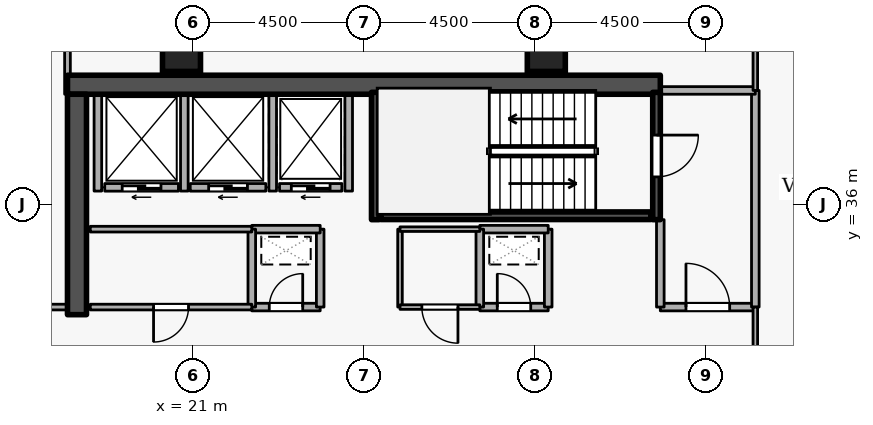
"""IFC4 building model, lengths in metres.
Left out: names, types, materials, properties, quantities, classifications, styles, units other than length and angle.
Written with IfcOpenShell. Run it as: python <this file> out.ifc"""

import sys

from ifc_helpers import new_model, si_unit, direction, frame, frame_2d, origin, origin_2d, place, context, subcontext, project, spatial, rectangle, extrude, element, fill, save


model = new_model("IFC4")
c1 = context("Model", 3, precision=1e-05, world=origin(), true_north=direction((0.0, 1.0)))
c2 = subcontext(c1, "Body", "Model", "MODEL_VIEW")
j1 = project(units=[si_unit("LENGTHUNIT", "METRE"), si_unit("PLANEANGLEUNIT", "RADIAN")], contexts=[c1])
p1 = place(None, origin())
s1 = spatial("IfcSite", under=j1, at=p1, CompositionType="ELEMENT")
p2 = place(p1, origin())
s2 = spatial("IfcBuilding", under=s1, at=p2, CompositionType="ELEMENT")
p3 = place(p2, frame((0.0, 0.0, 236.7)))
s3 = spatial("IfcBuildingStorey", under=s2, at=p3, CompositionType="ELEMENT", Elevation=236.7)
p4 = place(p3, frame((17.7, 39.15, 0.0), z_axis=(0.0, 0.0, 1.0), x_axis=(1.0, 0.0, 0.0)))
e1 = element("IfcWall", 1, at=p4, inside=s3, PredefinedType="SHEAR", context=c2, shape_type="SweptSolid", body=[
    extrude(rectangle(XDim=15.6, YDim=0.5, at=frame_2d((7.8, 0.0))), origin(), (0.0, 0.0, 1.0), 3.6),
])
p5 = place(p3, frame((17.95, 33.1, 0.0), z_axis=(0.0, 0.0, 1.0), x_axis=(0.0, 1.0, 0.0)))
e2 = element("IfcWall", 2, at=p5, inside=s3, PredefinedType="SHEAR", context=c2, shape_type="SweptSolid", body=[
    extrude(rectangle(XDim=5.8, YDim=0.5, at=frame_2d((2.9, 0.0))), origin(), (0.0, 0.0, 1.0), 3.6),
])
for number, where, z_axis, x_axis in (
    (3, (20.7, 40.0, 0.0), (0.0, 0.0, 1.0), (1.0, 0.0, 0.0)),
    (4, (30.3, 40.0, 0.0), (0.0, 0.0, 1.0), (1.0, 0.0, 0.0)),
):
    element("IfcColumn", number, at=place(p3, frame(where, z_axis=z_axis, x_axis=x_axis)), inside=s3, PredefinedType="COLUMN", context=c2, shape_type="SweptSolid", body=[
        extrude(rectangle(XDim=1.0, YDim=1.0, at=origin_2d()), origin(), (0.0, 0.0, 1.0), 3.6),
    ])
p6 = place(p3, frame((24.92, 36.45, 0.0), z_axis=(0.0, 0.0, 1.0), x_axis=(-1.0, 0.0, 0.0)))
e5 = element("IfcWall", 5, at=p6, inside=s3, PredefinedType="STANDARD", context=c2, shape_type="SweptSolid", body=[
    extrude(rectangle(XDim=1.64, YDim=0.2, at=frame_2d((0.82, 0.0))), origin(), (0.0, 0.0, 1.0), 3.34),
])
p7 = place(p6, frame((0.31, 0.0, 0.0)))
e6 = element("IfcOpeningElement", 6, at=p7, cuts=e5, PredefinedType="OPENING", context=c2, shape_type="SweptSolid", body=[
    extrude(rectangle(XDim=1.02, YDim=2.06, at=frame_2d((0.51, 1.03))), frame((0.0, 0.11, 0.0), z_axis=(0.0, -1.0, 0.0), x_axis=(1.0, 0.0, 0.0)), (0.0, 0.0, 1.0), 0.22),
])
p8 = place(p3, frame((22.92, 36.45, 0.0), z_axis=(0.0, 0.0, 1.0), x_axis=(-1.0, 0.0, 0.0)))
e7 = element("IfcWall", 7, at=p8, inside=s3, PredefinedType="STANDARD", context=c2, shape_type="SweptSolid", body=[
    extrude(rectangle(XDim=1.99, YDim=0.2, at=frame_2d((0.995, 0.0))), origin(), (0.0, 0.0, 1.0), 3.34),
])
p9 = place(p8, frame((0.485, 0.0, 0.0)))
e8 = element("IfcOpeningElement", 8, at=p9, cuts=e7, PredefinedType="OPENING", context=c2, shape_type="SweptSolid", body=[
    extrude(rectangle(XDim=1.02, YDim=2.06, at=frame_2d((0.51, 1.03))), frame((0.0, 0.11, 0.0), z_axis=(0.0, -1.0, 0.0), x_axis=(1.0, 0.0, 0.0)), (0.0, 0.0, 1.0), 0.22),
])
p10 = place(p3, frame((20.62, 36.45, 0.0), z_axis=(0.0, 0.0, 1.0), x_axis=(-1.0, 0.0, 0.0)))
e9 = element("IfcWall", 9, at=p10, inside=s3, PredefinedType="STANDARD", context=c2, shape_type="SweptSolid", body=[
    extrude(rectangle(XDim=1.94, YDim=0.2, at=frame_2d((0.97, 0.0))), origin(), (0.0, 0.0, 1.0), 3.34),
])
p11 = place(p10, frame((0.46, 0.0, 0.0)))
e10 = element("IfcOpeningElement", 10, at=p11, cuts=e9, PredefinedType="OPENING", context=c2, shape_type="SweptSolid", body=[
    extrude(rectangle(XDim=1.02, YDim=2.06, at=frame_2d((0.51, 1.03))), frame((0.0, 0.11, 0.0), z_axis=(0.0, -1.0, 0.0), x_axis=(1.0, 0.0, 0.0)), (0.0, 0.0, 1.0), 0.22),
])
for number, where, z_axis, x_axis in (
    (11, (25.1, 36.352, 0.0), (0.0, 0.0, 1.0), (0.0, 1.0, 0.0)),
    (12, (23.1, 36.352, 0.0), (0.0, 0.0, 1.0), (0.0, 1.0, 0.0)),
    (13, (20.775, 36.352, 0.0), (0.0, 0.0, 1.0), (0.0, 1.0, 0.0)),
    (14, (18.5, 36.352, 0.0), (0.0, 0.0, 1.0), (0.0, 1.0, 0.0)),
):
    element("IfcWall", number, at=place(p3, frame(where, z_axis=z_axis, x_axis=x_axis)), inside=s3, PredefinedType="STANDARD", context=c2, shape_type="SweptSolid", body=[
        extrude(rectangle(XDim=2.536, YDim=0.2, at=frame_2d((1.268, 0.0))), origin(), (0.0, 0.0, 1.0), 3.34),
    ])
p12 = place(p3, frame((33.2, 38.95, 0.0), z_axis=(0.0, 0.0, 1.0), x_axis=(0.0, -1.0, 0.0)))
e15 = element("IfcWall", 15, at=p12, inside=s3, PredefinedType="SHEAR", context=c2, shape_type="SweptSolid", body=[
    extrude(rectangle(XDim=3.35, YDim=0.2, at=frame_2d((1.675, 0.0))), origin(), (0.0, 0.0, 1.0), 3.6),
])
p13 = place(p12, frame((1.125, 0.0, 0.0)))
e16 = element("IfcOpeningElement", 16, at=p13, cuts=e15, PredefinedType="OPENING", context=c2, shape_type="SweptSolid", body=[
    extrude(rectangle(XDim=1.1, YDim=2.1, at=frame_2d((0.55, 1.05))), frame((0.0, 0.11, 0.0), z_axis=(0.0, -1.0, 0.0), x_axis=(1.0, 0.0, 0.0)), (0.0, 0.0, 1.0), 0.22),
])
p14 = place(p3, frame((25.8, 35.6, 0.0), z_axis=(0.0, 0.0, 1.0), x_axis=(0.0, 1.0, 0.0)))
e17 = element("IfcWall", 17, at=p14, inside=s3, PredefinedType="SHEAR", context=c2, shape_type="SweptSolid", body=[
    extrude(rectangle(XDim=3.35, YDim=0.2, at=frame_2d((1.675, 0.0))), origin(), (0.0, 0.0, 1.0), 3.6),
])
p15 = place(p3, frame((25.95, 35.703, 0.0), z_axis=(0.0, 0.0, 1.0), x_axis=(1.0, 0.0, 0.0)))
e18 = element("IfcWall", 18, at=p15, inside=s3, PredefinedType="SHEAR", context=c2, shape_type="SweptSolid", body=[
    extrude(rectangle(XDim=7.1, YDim=0.2, at=frame_2d((3.55, 0.0))), origin(), (0.0, 0.0, 1.0), 3.6),
])
p16 = place(p3, frame((33.3, 33.3, 0.0), z_axis=(0.0, 0.0, 1.0), x_axis=(1.0, 0.0, 0.0)))
e19 = element("IfcWall", 19, at=p16, inside=s3, PredefinedType="STANDARD", context=c2, shape_type="SweptSolid", body=[
    extrude(rectangle(XDim=2.5, YDim=0.2, at=frame_2d((1.25, 0.0))), origin(), (0.0, 0.0, 1.0), 3.34),
])
p17 = place(p16, frame((0.675, 0.0, 0.0)))
e20 = element("IfcOpeningElement", 20, at=p17, cuts=e19, PredefinedType="OPENING", context=c2, shape_type="SweptSolid", body=[
    extrude(rectangle(XDim=1.15, YDim=2.1, at=frame_2d((0.575, 1.05))), frame((0.0, 0.11, 0.0), z_axis=(0.0, -1.0, 0.0), x_axis=(1.0, 0.0, 0.0)), (0.0, 0.0, 1.0), 0.22),
])
p18 = place(p3, frame((35.8, 33.3, 0.0), z_axis=(0.0, 0.0, 1.0), x_axis=(0.0, 1.0, 0.0)))
e21 = element("IfcWall", 21, at=p18, inside=s3, PredefinedType="STANDARD", context=c2, shape_type="SweptSolid", body=[
    extrude(rectangle(XDim=5.7, YDim=0.2, at=frame_2d((2.85, 0.0))), origin(), (0.0, 0.0, 1.0), 3.34),
])
p19 = place(p3, frame((35.8, 39.0, 0.0), z_axis=(0.0, 0.0, 1.0), x_axis=(-1.0, 0.0, 0.0)))
e22 = element("IfcWall", 22, at=p19, inside=s3, PredefinedType="STANDARD", context=c2, shape_type="SweptSolid", body=[
    extrude(rectangle(XDim=2.5, YDim=0.2, at=frame_2d((1.25, 0.0))), origin(), (0.0, 0.0, 1.0), 3.34),
])
p20 = place(p3, frame((33.3, 35.6, 0.0), z_axis=(0.0, 0.0, 1.0), x_axis=(0.0, -1.0, 0.0)))
e23 = element("IfcWall", 23, at=p20, inside=s3, PredefinedType="STANDARD", context=c2, shape_type="SweptSolid", body=[
    extrude(rectangle(XDim=2.3, YDim=0.2, at=frame_2d((1.15, 0.0))), origin(), (0.0, 0.0, 1.0), 2.545),
])
p21 = place(p3, frame((22.55, 33.3, 0.0), z_axis=(0.0, 0.0, 1.0), x_axis=(1.0, 0.0, 0.0)))
e24 = element("IfcWall", 24, at=p21, inside=s3, PredefinedType="STANDARD", context=c2, shape_type="SweptSolid", body=[
    extrude(rectangle(XDim=1.8, YDim=0.2, at=frame_2d((0.9, 0.0))), origin(), (0.0, 0.0, 1.0), 3.34),
])
p22 = place(p21, frame((0.46, 0.0, 0.0)))
e25 = element("IfcOpeningElement", 25, at=p22, cuts=e24, PredefinedType="OPENING", context=c2, shape_type="SweptSolid", body=[
    extrude(rectangle(XDim=0.88, YDim=2.04, at=frame_2d((0.44, 1.02))), frame((0.0, 0.11, 0.0), z_axis=(0.0, -1.0, 0.0), x_axis=(1.0, 0.0, 0.0)), (0.0, 0.0, 1.0), 0.22),
])
p23 = place(p3, frame((24.35, 33.3, 0.0), z_axis=(0.0, 0.0, 1.0), x_axis=(0.0, 1.0, 0.0)))
e26 = element("IfcWall", 26, at=p23, inside=s3, PredefinedType="STANDARD", context=c2, shape_type="SweptSolid", body=[
    extrude(rectangle(XDim=2.05, YDim=0.2, at=frame_2d((1.025, 0.0))), origin(), (0.0, 0.0, 1.0), 3.34),
])
p24 = place(p3, frame((24.35, 35.35, 0.0), z_axis=(0.0, 0.0, 1.0), x_axis=(-1.0, 0.0, 0.0)))
e27 = element("IfcWall", 27, at=p24, inside=s3, PredefinedType="STANDARD", context=c2, shape_type="SweptSolid", body=[
    extrude(rectangle(XDim=1.8, YDim=0.2, at=frame_2d((0.9, 0.0))), origin(), (0.0, 0.0, 1.0), 3.34),
])
p25 = place(p3, frame((22.55, 35.35, 0.0), z_axis=(0.0, 0.0, 1.0), x_axis=(0.0, -1.0, 0.0)))
e28 = element("IfcWall", 28, at=p25, inside=s3, PredefinedType="STANDARD", context=c2, shape_type="SweptSolid", body=[
    extrude(rectangle(XDim=2.05, YDim=0.2, at=frame_2d((1.025, 0.0))), origin(), (0.0, 0.0, 1.0), 3.34),
])
p26 = place(p3, frame((28.55, 33.3, 0.0), z_axis=(0.0, 0.0, 1.0), x_axis=(1.0, 0.0, 0.0)))
e29 = element("IfcWall", 29, at=p26, inside=s3, PredefinedType="STANDARD", context=c2, shape_type="SweptSolid", body=[
    extrude(rectangle(XDim=1.8, YDim=0.2, at=frame_2d((0.9, 0.0))), origin(), (0.0, 0.0, 1.0), 3.34),
])
p27 = place(p26, frame((0.46, 0.0, 0.0)))
e30 = element("IfcOpeningElement", 30, at=p27, cuts=e29, PredefinedType="OPENING", context=c2, shape_type="SweptSolid", body=[
    extrude(rectangle(XDim=0.88, YDim=2.04, at=frame_2d((0.44, 1.02))), frame((0.0, 0.11, 0.0), z_axis=(0.0, -1.0, 0.0), x_axis=(1.0, 0.0, 0.0)), (0.0, 0.0, 1.0), 0.22),
])
p28 = place(p3, frame((30.35, 33.3, 0.0), z_axis=(0.0, 0.0, 1.0), x_axis=(0.0, 1.0, 0.0)))
e31 = element("IfcWall", 31, at=p28, inside=s3, PredefinedType="STANDARD", context=c2, shape_type="SweptSolid", body=[
    extrude(rectangle(XDim=2.05, YDim=0.2, at=frame_2d((1.025, 0.0))), origin(), (0.0, 0.0, 1.0), 3.34),
])
p29 = place(p3, frame((30.35, 35.35, 0.0), z_axis=(0.0, 0.0, 1.0), x_axis=(-1.0, 0.0, 0.0)))
e32 = element("IfcWall", 32, at=p29, inside=s3, PredefinedType="STANDARD", context=c2, shape_type="SweptSolid", body=[
    extrude(rectangle(XDim=1.8, YDim=0.2, at=frame_2d((0.9, 0.0))), origin(), (0.0, 0.0, 1.0), 3.34),
])
p30 = place(p3, frame((28.55, 35.35, 0.0), z_axis=(0.0, 0.0, 1.0), x_axis=(0.0, -1.0, 0.0)))
e33 = element("IfcWall", 33, at=p30, inside=s3, PredefinedType="STANDARD", context=c2, shape_type="SweptSolid", body=[
    extrude(rectangle(XDim=2.05, YDim=0.2, at=frame_2d((1.025, 0.0))), origin(), (0.0, 0.0, 1.0), 3.34),
])
p31 = place(p3, frame((18.3, 35.35, 0.0), z_axis=(0.0, 0.0, 1.0), x_axis=(1.0, 0.0, 0.0)))
e34 = element("IfcWall", 34, at=p31, inside=s3, PredefinedType="PARTITIONING", context=c2, shape_type="SweptSolid", body=[
    extrude(rectangle(XDim=4.25, YDim=0.15, at=frame_2d((2.125, 0.0))), origin(), (0.0, 0.0, 1.0), 3.34),
])
p32 = place(p3, frame((22.55, 33.3, 0.0), z_axis=(0.0, 0.0, 1.0), x_axis=(-1.0, 0.0, 0.0)))
e35 = element("IfcWall", 35, at=p32, inside=s3, PredefinedType="PARTITIONING", context=c2, shape_type="SweptSolid", body=[
    extrude(rectangle(XDim=4.25, YDim=0.15, at=frame_2d((2.125, 0.0))), origin(), (0.0, 0.0, 1.0), 3.34),
])
p33 = place(p32, frame((1.665, 0.0, 0.0)))
e36 = element("IfcOpeningElement", 36, at=p33, cuts=e35, PredefinedType="OPENING", context=c2, shape_type="SweptSolid", body=[
    extrude(rectangle(XDim=0.92, YDim=2.08, at=frame_2d((0.46, 1.04))), frame((0.0, 0.085, 0.0), z_axis=(0.0, -1.0, 0.0), x_axis=(1.0, 0.0, 0.0)), (0.0, 0.0, 1.0), 0.17),
])
p34 = place(p3, frame((26.45, 33.3, 0.0), z_axis=(0.0, 0.0, 1.0), x_axis=(0.0, 1.0, 0.0)))
e37 = element("IfcWall", 37, at=p34, inside=s3, PredefinedType="PARTITIONING", context=c2, shape_type="SweptSolid", body=[
    extrude(rectangle(XDim=2.05, YDim=0.12, at=frame_2d((1.025, 0.0))), origin(), (0.0, 0.0, 1.0), 3.34),
])
p35 = place(p3, frame((26.45, 35.35, 0.0), z_axis=(0.0, 0.0, 1.0), x_axis=(1.0, 0.0, 0.0)))
e38 = element("IfcWall", 38, at=p35, inside=s3, PredefinedType="PARTITIONING", context=c2, shape_type="SweptSolid", body=[
    extrude(rectangle(XDim=2.1, YDim=0.12, at=frame_2d((1.05, 0.0))), origin(), (0.0, 0.0, 1.0), 3.34),
])
p36 = place(p3, frame((28.55, 33.3, 0.0), z_axis=(0.0, 0.0, 1.0), x_axis=(-1.0, 0.0, 0.0)))
e39 = element("IfcWall", 39, at=p36, inside=s3, PredefinedType="PARTITIONING", context=c2, shape_type="SweptSolid", body=[
    extrude(rectangle(XDim=2.1, YDim=0.12, at=frame_2d((1.05, 0.0))), origin(), (0.0, 0.0, 1.0), 3.34),
])
p37 = place(p36, frame((0.575, 0.0, 0.0)))
e40 = element("IfcOpeningElement", 40, at=p37, cuts=e39, PredefinedType="OPENING", context=c2, shape_type="SweptSolid", body=[
    extrude(rectangle(XDim=0.95, YDim=2.1, at=frame_2d((0.475, 1.05))), frame((0.0, 0.07, 0.0), z_axis=(0.0, -1.0, 0.0), x_axis=(1.0, 0.0, 0.0)), (0.0, 0.0, 1.0), 0.14),
])
p38 = place(p3, frame((17.7, 44.72, 0.0), z_axis=(0.0, 0.0, 1.0), x_axis=(0.0, -1.0, 0.0)))
e41 = element("IfcWall", 41, at=p38, inside=s3, PredefinedType="PARTITIONING", context=c2, shape_type="SweptSolid", body=[
    extrude(rectangle(XDim=5.82, YDim=0.15, at=frame_2d((2.91, 0.0))), origin(), (0.0, 0.0, 1.0), 2.545),
])
p39 = place(p3, frame((17.7, 33.3, 0.0), z_axis=(0.0, 0.0, 1.0), x_axis=(-1.0, 0.0, 0.0)))
e42 = element("IfcWall", 42, at=p39, inside=s3, PredefinedType="PARTITIONING", context=c2, shape_type="SweptSolid", body=[
    extrude(rectangle(XDim=4.35, YDim=0.15, at=frame_2d((2.175, 0.0))), origin(), (0.0, 0.0, 1.0), 3.34),
])
p40 = place(p39, frame((1.525, 0.0, 0.0)))
e43 = element("IfcOpeningElement", 43, at=p40, cuts=e42, PredefinedType="OPENING", context=c2, shape_type="SweptSolid", body=[
    extrude(rectangle(XDim=1.3, YDim=2.12, at=frame_2d((0.65, 1.06))), frame((0.0, 0.085, 0.0), z_axis=(0.0, -1.0, 0.0), x_axis=(1.0, 0.0, 0.0)), (0.0, 0.0, 1.0), 0.17),
])
p41 = place(p3, frame((35.8, 39.0, 0.0), z_axis=(0.0, 0.0, 1.0), x_axis=(0.0, 1.0, 0.0)))
e44 = element("IfcWall", 44, at=p41, inside=s3, PredefinedType="PARTITIONING", context=c2, shape_type="SweptSolid", body=[
    extrude(rectangle(XDim=5.72, YDim=0.12, at=frame_2d((2.86, 0.0))), origin(), (0.0, 0.0, 1.0), 3.34),
])
p42 = place(p3, frame((35.8, 27.0, 0.0), z_axis=(0.0, 0.0, 1.0), x_axis=(0.0, 1.0, 0.0)))
e45 = element("IfcWall", 45, at=p42, inside=s3, PredefinedType="PARTITIONING", context=c2, shape_type="SweptSolid", body=[
    extrude(rectangle(XDim=6.3, YDim=0.12, at=frame_2d((3.15, 0.0))), origin(), (0.0, 0.0, 1.0), 3.34),
])
p43 = place(p42, frame((2.625, 0.0, 0.0)))
e46 = element("IfcOpeningElement", 46, at=p43, cuts=e45, PredefinedType="OPENING", context=c2, shape_type="SweptSolid", body=[
    extrude(rectangle(XDim=1.05, YDim=2.1, at=frame_2d((0.525, 1.05))), frame((0.0, 0.07, 0.0), z_axis=(0.0, -1.0, 0.0), x_axis=(1.0, 0.0, 0.0)), (0.0, 0.0, 1.0), 0.14),
])
p44 = place(p7, origin())
e47 = element("IfcDoor", 47, at=p44, inside=s3, OperationType="SLIDING_TO_LEFT", PredefinedType="DOOR", context=c2, shape_type="SweptSolid", body=[
    extrude(rectangle(XDim=1.02, YDim=2.06, at=frame_2d((0.51, 1.03))), frame((0.0, 0.025, 0.0), z_axis=(0.0, -1.0, 0.0), x_axis=(1.0, 0.0, 0.0)), (0.0, 0.0, 1.0), 0.05),
])
fill(e6, e47)
p45 = place(p9, origin())
e48 = element("IfcDoor", 48, at=p45, inside=s3, OperationType="SLIDING_TO_LEFT", PredefinedType="DOOR", context=c2, shape_type="SweptSolid", body=[
    extrude(rectangle(XDim=1.02, YDim=2.06, at=frame_2d((0.51, 1.03))), frame((0.0, 0.025, 0.0), z_axis=(0.0, -1.0, 0.0), x_axis=(1.0, 0.0, 0.0)), (0.0, 0.0, 1.0), 0.05),
])
fill(e8, e48)
p46 = place(p11, origin())
e49 = element("IfcDoor", 49, at=p46, inside=s3, OperationType="SLIDING_TO_LEFT", PredefinedType="DOOR", context=c2, shape_type="SweptSolid", body=[
    extrude(rectangle(XDim=1.02, YDim=2.06, at=frame_2d((0.51, 1.03))), frame((0.0, 0.025, 0.0), z_axis=(0.0, -1.0, 0.0), x_axis=(1.0, 0.0, 0.0)), (0.0, 0.0, 1.0), 0.05),
])
fill(e10, e49)
p47 = place(p13, origin())
e50 = element("IfcDoor", 50, at=p47, inside=s3, OperationType="SINGLE_SWING_LEFT", PredefinedType="DOOR", context=c2, shape_type="SweptSolid", body=[
    extrude(rectangle(XDim=1.1, YDim=2.1, at=frame_2d((0.55, 1.05))), frame((0.0, 0.025, 0.0), z_axis=(0.0, -1.0, 0.0), x_axis=(1.0, 0.0, 0.0)), (0.0, 0.0, 1.0), 0.05),
])
fill(e16, e50)
p48 = place(p17, origin())
e51 = element("IfcDoor", 51, at=p48, inside=s3, OperationType="SINGLE_SWING_LEFT", PredefinedType="DOOR", context=c2, shape_type="SweptSolid", body=[
    extrude(rectangle(XDim=1.15, YDim=2.1, at=frame_2d((0.575, 1.05))), frame((0.0, 0.025, 0.0), z_axis=(0.0, -1.0, 0.0), x_axis=(1.0, 0.0, 0.0)), (0.0, 0.0, 1.0), 0.05),
])
fill(e20, e51)
p49 = place(p22, origin())
e52 = element("IfcDoor", 52, at=p49, inside=s3, OperationType="SINGLE_SWING_RIGHT", PredefinedType="DOOR", context=c2, shape_type="SweptSolid", body=[
    extrude(rectangle(XDim=0.88, YDim=2.04, at=frame_2d((0.44, 1.02))), frame((0.0, 0.025, 0.0), z_axis=(0.0, -1.0, 0.0), x_axis=(1.0, 0.0, 0.0)), (0.0, 0.0, 1.0), 0.05),
])
fill(e25, e52)
p50 = place(p27, origin())
e53 = element("IfcDoor", 53, at=p50, inside=s3, OperationType="SINGLE_SWING_LEFT", PredefinedType="DOOR", context=c2, shape_type="SweptSolid", body=[
    extrude(rectangle(XDim=0.88, YDim=2.04, at=frame_2d((0.44, 1.02))), frame((0.0, 0.025, 0.0), z_axis=(0.0, -1.0, 0.0), x_axis=(1.0, 0.0, 0.0)), (0.0, 0.0, 1.0), 0.05),
])
fill(e30, e53)
p51 = place(p33, origin())
e54 = element("IfcDoor", 54, at=p51, inside=s3, OperationType="SINGLE_SWING_RIGHT", PredefinedType="DOOR", context=c2, shape_type="SweptSolid", body=[
    extrude(rectangle(XDim=0.92, YDim=2.08, at=frame_2d((0.46, 1.04))), frame((0.0, 0.025, 0.0), z_axis=(0.0, -1.0, 0.0), x_axis=(1.0, 0.0, 0.0)), (0.0, 0.0, 1.0), 0.05),
])
fill(e36, e54)
p52 = place(p37, origin())
e55 = element("IfcDoor", 55, at=p52, inside=s3, OperationType="SINGLE_SWING_LEFT", PredefinedType="DOOR", context=c2, shape_type="SweptSolid", body=[
    extrude(rectangle(XDim=0.95, YDim=2.1, at=frame_2d((0.475, 1.05))), frame((0.0, 0.025, 0.0), z_axis=(0.0, -1.0, 0.0), x_axis=(1.0, 0.0, 0.0)), (0.0, 0.0, 1.0), 0.05),
])
fill(e40, e55)
save(model, sys.argv[1])
